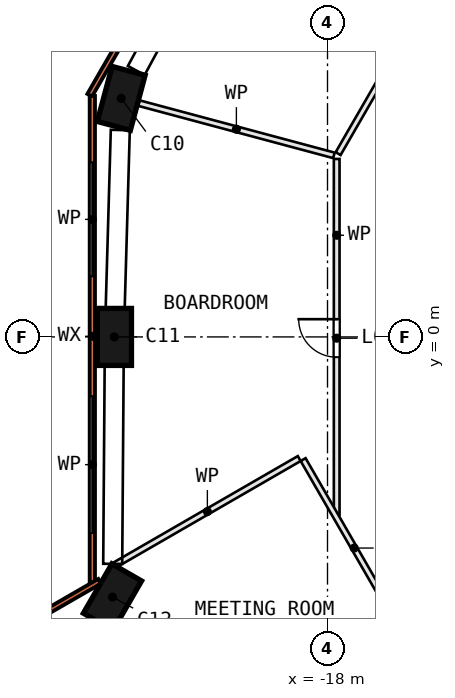
"""IFC4 building model, lengths in metres.
Left out: names, types, materials, properties, quantities, classifications, styles, units other than length and angle.
Written with IfcOpenShell. Run it as: python <this file> out.ifc"""

import sys

from ifc_helpers import new_model, si_unit, direction, frame, frame_2d, origin, origin_2d, place, context, subcontext, project, spatial, rectangle, extrude, element, fill, save


model = new_model("IFC4")
c1 = context("Model", 3, precision=1e-05, world=origin(), true_north=direction((0.0, 1.0)))
c2 = subcontext(c1, "Body", "Model", "MODEL_VIEW")
j1 = project(units=[si_unit("LENGTHUNIT", "METRE"), si_unit("PLANEANGLEUNIT", "RADIAN")], contexts=[c1])
p1 = place(None, origin())
s1 = spatial("IfcSite", under=j1, at=p1, CompositionType="ELEMENT")
p2 = place(p1, origin())
s2 = spatial("IfcBuilding", under=s1, at=p2, CompositionType="ELEMENT")
p3 = place(p2, frame((0.0, 0.0, 14.0)))
s3 = spatial("IfcBuildingStorey", under=s2, at=p3, CompositionType="ELEMENT", Elevation=14.0)
for number, where, z_axis, x_axis in (
    (1, (-23.428, 6.278, 0.0), (0.0, 0.0, 1.0), (0.259, 0.966, 0.0)),
    (2, (-23.608, 0.0, 0.0), (0.0, 0.0, 1.0), (0.0, -1.0, 0.0)),
    (3, (-23.658, -6.846, 0.0), (0.0, 0.0, 1.0), (0.5, 0.866, 0.0)),
):
    element("IfcColumn", number, at=place(p3, frame(where, z_axis=z_axis, x_axis=x_axis)), inside=s3, PredefinedType="COLUMN", context=c2, shape_type="SweptSolid", body=[
        extrude(rectangle(XDim=1.5, YDim=0.9, at=origin_2d()), origin(), (0.0, 0.0, 1.0), 4.55),
    ])
p4 = place(p3, frame((-17.777, 17.586, 0.0), z_axis=(0.0, 0.0, 1.0), x_axis=(-0.500006139, -0.866021859, 0.0)))
e4 = element("IfcWall", 4, at=p4, inside=s3, PredefinedType="SOLIDWALL", context=c2, shape_type="SweptSolid", body=[
    extrude(rectangle(XDim=12.962, YDim=0.14, at=frame_2d((6.481, 0.0))), origin(), (0.0, 0.0, 1.0), 4.55),
])
p5 = place(p4, frame((1.748, 0.0, 0.9)))
e5 = element("IfcOpeningElement", 5, at=p5, cuts=e4, PredefinedType="OPENING", context=c2, shape_type="SweptSolid", body=[
    extrude(rectangle(XDim=3.0, YDim=2.7, at=frame_2d((1.5, 1.35))), frame((0.0, 0.08, 0.0), z_axis=(0.0, -1.0, 0.0), x_axis=(1.0, 0.0, 0.0)), (0.0, 0.0, 1.0), 0.16),
])
p6 = place(p4, frame((7.935, 0.0, 0.9)))
e6 = element("IfcOpeningElement", 6, at=p6, cuts=e4, PredefinedType="OPENING", context=c2, shape_type="SweptSolid", body=[
    extrude(rectangle(XDim=3.0, YDim=2.7, at=frame_2d((1.5, 1.35))), frame((0.0, 0.08, 0.0), z_axis=(0.0, -1.0, 0.0), x_axis=(1.0, 0.0, 0.0)), (0.0, 0.0, 1.0), 0.16),
])
p7 = place(p3, frame((-24.188, 6.341, 0.0), z_axis=(0.0, 0.0, 1.0), x_axis=(0.0, -1.0, 0.0)))
e7 = element("IfcWall", 7, at=p7, inside=s3, PredefinedType="SOLIDWALL", context=c2, shape_type="SweptSolid", body=[
    extrude(rectangle(XDim=12.801, YDim=0.14, at=frame_2d((6.4, 0.0))), origin(), (0.0, 0.0, 1.0), 4.55),
])
p8 = place(p7, frame((1.748, 0.0, 0.9)))
e8 = element("IfcOpeningElement", 8, at=p8, cuts=e7, PredefinedType="OPENING", context=c2, shape_type="SweptSolid", body=[
    extrude(rectangle(XDim=3.0, YDim=2.7, at=frame_2d((1.5, 1.35))), frame((0.0, 0.08, 0.0), z_axis=(0.0, -1.0, 0.0), x_axis=(1.0, 0.0, 0.0)), (0.0, 0.0, 1.0), 0.16),
])
p9 = place(p7, frame((7.902, 0.0, 0.9)))
e9 = element("IfcOpeningElement", 9, at=p9, cuts=e7, PredefinedType="OPENING", context=c2, shape_type="SweptSolid", body=[
    extrude(rectangle(XDim=3.6, YDim=2.7, at=frame_2d((1.8, 1.35))), frame((0.0, 0.08, 0.0), z_axis=(0.0, -1.0, 0.0), x_axis=(1.0, 0.0, 0.0)), (0.0, 0.0, 1.0), 0.16),
])
p10 = place(p3, frame((-23.995, -6.429, 0.0), z_axis=(0.0, 0.0, 1.0), x_axis=(-0.866018753, -0.500011519, 0.0)))
e10 = element("IfcWall", 10, at=p10, inside=s3, PredefinedType="SOLIDWALL", context=c2, shape_type="SweptSolid", body=[
    extrude(rectangle(XDim=11.405, YDim=0.14, at=frame_2d((5.703, 0.0))), origin(), (0.0, 0.0, 1.0), 4.55),
])
p11 = place(p10, frame((1.623, 0.0, 0.9)))
e11 = element("IfcOpeningElement", 11, at=p11, cuts=e10, PredefinedType="OPENING", context=c2, shape_type="SweptSolid", body=[
    extrude(rectangle(XDim=3.6, YDim=2.7, at=frame_2d((1.8, 1.35))), frame((0.0, 0.08, 0.0), z_axis=(0.0, -1.0, 0.0), x_axis=(1.0, 0.0, 0.0)), (0.0, 0.0, 1.0), 0.16),
])
p12 = place(p3, frame((-22.965, 6.153, 0.0), z_axis=(0.0, 0.0, 1.0), x_axis=(0.965919345, -0.258843233, 0.0)))
e12 = element("IfcWall", 12, at=p12, inside=s3, PredefinedType="PARTITIONING", context=c2, shape_type="SweptSolid", body=[
    extrude(rectangle(XDim=5.315, YDim=0.15, at=frame_2d((2.657, 0.0))), origin(), (0.0, 0.0, 1.0), 4.55),
])
p13 = place(p3, frame((-18.744, -3.201, 0.0), z_axis=(0.0, 0.0, 1.0), x_axis=(-0.866027538, -0.499996304, 0.0)))
e13 = element("IfcWall", 13, at=p13, inside=s3, PredefinedType="PARTITIONING", context=c2, shape_type="SweptSolid", body=[
    extrude(rectangle(XDim=5.582, YDim=0.15, at=frame_2d((2.791, 0.0))), origin(), (0.0, 0.0, 1.0), 4.55),
])
p14 = place(p3, frame((-17.758, -4.683, 0.0), z_axis=(0.0, 0.0, 1.0), x_axis=(0.0, 1.0, 0.0)))
e14 = element("IfcWall", 14, at=p14, inside=s3, PredefinedType="PARTITIONING", context=c2, shape_type="SweptSolid", body=[
    extrude(rectangle(XDim=9.367, YDim=0.15, at=frame_2d((4.683, 0.0))), origin(), (0.0, 0.0, 1.0), 4.55),
])
p15 = place(p14, frame((4.15, 0.0, 0.0)))
e15 = element("IfcOpeningElement", 15, at=p15, cuts=e14, PredefinedType="OPENING", context=c2, shape_type="SweptSolid", body=[
    extrude(rectangle(XDim=1.0, YDim=2.1, at=frame_2d((0.5, 1.05))), frame((0.0, 0.085, 0.0), z_axis=(0.0, -1.0, 0.0), x_axis=(1.0, 0.0, 0.0)), (0.0, 0.0, 1.0), 0.17),
])
p16 = place(p3, frame((-13.038, 12.935, 0.0), z_axis=(0.0, 0.0, 1.0), x_axis=(-0.499979668, -0.866037142, 0.0)))
e16 = element("IfcWall", 16, at=p16, inside=s3, PredefinedType="PARTITIONING", context=c2, shape_type="SweptSolid", body=[
    extrude(rectangle(XDim=9.367, YDim=0.15, at=frame_2d((4.683, 0.0))), origin(), (0.0, 0.0, 1.0), 4.55),
])
p17 = place(p16, frame((3.817, 0.0, 0.0)))
e17 = element("IfcOpeningElement", 17, at=p17, cuts=e16, PredefinedType="OPENING", context=c2, shape_type="SweptSolid", body=[
    extrude(rectangle(XDim=1.8, YDim=2.1, at=frame_2d((0.9, 1.05))), frame((0.0, 0.085, 0.0), z_axis=(0.0, -1.0, 0.0), x_axis=(1.0, 0.0, 0.0)), (0.0, 0.0, 1.0), 0.17),
])
p18 = place(p3, frame((-15.954, -7.883, 0.0), z_axis=(0.0, 0.0, 1.0), x_axis=(-0.4999885, 0.866032043, 0.0)))
e18 = element("IfcWall", 18, at=p18, inside=s3, PredefinedType="PARTITIONING", context=c2, shape_type="SweptSolid", body=[
    extrude(rectangle(XDim=5.375, YDim=0.15, at=frame_2d((2.688, 0.0))), origin(), (0.0, 0.0, 1.0), 4.55),
])
p19 = place(p8, origin())
e19 = element("IfcWindow", 19, at=p19, inside=s3, PartitioningType="SINGLE_PANEL", PredefinedType="WINDOW", context=c2, shape_type="SweptSolid", body=[
    extrude(rectangle(XDim=3.0, YDim=2.7, at=frame_2d((1.5, 1.35))), frame((0.0, 0.03, 0.0), z_axis=(0.0, -1.0, 0.0), x_axis=(1.0, 0.0, 0.0)), (0.0, 0.0, 1.0), 0.06),
])
fill(e8, e19)
p20 = place(p9, origin())
e20 = element("IfcWindow", 20, at=p20, inside=s3, PartitioningType="SINGLE_PANEL", PredefinedType="WINDOW", context=c2, shape_type="SweptSolid", body=[
    extrude(rectangle(XDim=3.6, YDim=2.7, at=frame_2d((1.8, 1.35))), frame((0.0, 0.03, 0.0), z_axis=(0.0, -1.0, 0.0), x_axis=(1.0, 0.0, 0.0)), (0.0, 0.0, 1.0), 0.06),
])
fill(e9, e20)
p21 = place(p15, origin())
e21 = element("IfcDoor", 21, at=p21, inside=s3, OperationType="SINGLE_SWING_RIGHT", PredefinedType="DOOR", context=c2, shape_type="SweptSolid", body=[
    extrude(rectangle(XDim=1.0, YDim=2.1, at=frame_2d((0.5, 1.05))), frame((0.0, 0.025, 0.0), z_axis=(0.0, -1.0, 0.0), x_axis=(1.0, 0.0, 0.0)), (0.0, 0.0, 1.0), 0.05),
])
fill(e15, e21)
save(model, sys.argv[1])
